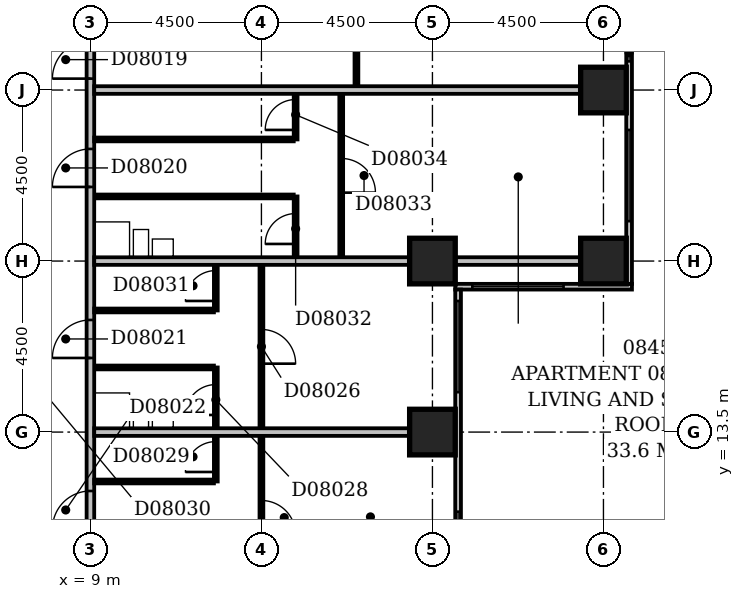
"""IFC4 building model, lengths in metres.
Left out: names, types, materials, properties, quantities, classifications, styles, units other than length and angle.
Written with IfcOpenShell. Run it as: python <this file> out.ifc"""

import sys

from ifc_helpers import new_model, si_unit, direction, frame, frame_2d, origin, origin_2d, place, context, subcontext, project, spatial, rectangle, extrude, element, fill, save


model = new_model("IFC4")
c1 = context("Model", 3, precision=1e-05, world=origin(), true_north=direction((0.0, 1.0)))
c2 = subcontext(c1, "Body", "Model", "MODEL_VIEW")
j1 = project(units=[si_unit("LENGTHUNIT", "METRE"), si_unit("PLANEANGLEUNIT", "RADIAN")], contexts=[c1])
p1 = place(None, origin())
s1 = spatial("IfcSite", under=j1, at=p1, CompositionType="ELEMENT")
p2 = place(p1, origin())
s2 = spatial("IfcBuilding", under=s1, at=p2, CompositionType="ELEMENT")
p3 = place(p2, frame((0.0, 0.0, 39.8)))
s3 = spatial("IfcBuildingStorey", under=s2, at=p3, CompositionType="ELEMENT", Elevation=39.8)
for number, where, z_axis, x_axis in (
    (1, (18.0, 13.5, -0.3), (0.0, 0.0, 1.0), (1.0, 0.0, 0.0)),
    (2, (18.0, 18.0, -0.3), (0.0, 0.0, 1.0), (1.0, 0.0, 0.0)),
    (3, (22.5, 18.0, -0.3), (0.0, 0.0, 1.0), (1.0, 0.0, 0.0)),
    (4, (22.5, 22.5, -0.3), (0.0, 0.0, 1.0), (1.0, 0.0, 0.0)),
):
    element("IfcColumn", number, at=place(p3, frame(where, z_axis=z_axis, x_axis=x_axis)), inside=s3, PredefinedType="COLUMN", context=c2, shape_type="SweptSolid", body=[
        extrude(rectangle(XDim=1.2, YDim=1.2, at=origin_2d()), origin(), (0.0, 0.0, 1.0), 3.6),
    ])
p4 = place(p3, frame((18.675, 8.4, 0.0), z_axis=(0.0, 0.0, 1.0), x_axis=(0.0, 1.0, 0.0)))
e5 = element("IfcWall", 5, at=p4, inside=s3, PredefinedType="STANDARD", context=c2, shape_type="SweptSolid", body=[
    extrude(rectangle(XDim=8.85, YDim=0.15, at=frame_2d((4.425, 0.0))), origin(), (0.0, 0.0, 1.0), 2.7),
])
p5 = place(p4, frame((1.505, 0.0, 0.6)))
e6 = element("IfcOpeningElement", 6, at=p5, cuts=e5, PredefinedType="OPENING", context=c2, shape_type="SweptSolid", body=[
    extrude(rectangle(XDim=1.5, YDim=1.8, at=frame_2d((0.75, 0.9))), frame((0.0, 0.087, 0.0), z_axis=(0.0, -1.0, 0.0), x_axis=(1.0, 0.0, 0.0)), (0.0, 0.0, 1.0), 0.174),
])
p6 = place(p4, frame((6.15, 0.0, 0.6)))
e7 = element("IfcOpeningElement", 7, at=p6, cuts=e5, PredefinedType="OPENING", context=c2, shape_type="SweptSolid", body=[
    extrude(rectangle(XDim=2.4, YDim=1.8, at=frame_2d((1.2, 0.9))), frame((0.0, 0.087, 0.0), z_axis=(0.0, -1.0, 0.0), x_axis=(1.0, 0.0, 0.0)), (0.0, 0.0, 1.0), 0.174),
])
p7 = place(p3, frame((18.6, 17.325, 0.0), z_axis=(0.0, 0.0, 1.0), x_axis=(1.0, 0.0, 0.0)))
e8 = element("IfcWall", 8, at=p7, inside=s3, PredefinedType="STANDARD", context=c2, shape_type="SweptSolid", body=[
    extrude(rectangle(XDim=4.65, YDim=0.15, at=frame_2d((2.325, 0.0))), origin(), (0.0, 0.0, 1.0), 2.7),
])
p8 = place(p7, frame((0.45, 0.0, 0.6)))
e9 = element("IfcOpeningElement", 9, at=p8, cuts=e8, PredefinedType="OPENING", context=c2, shape_type="SweptSolid", body=[
    extrude(rectangle(XDim=2.4, YDim=1.8, at=frame_2d((1.2, 0.9))), frame((0.0, 0.087, 0.0), z_axis=(0.0, -1.0, 0.0), x_axis=(1.0, 0.0, 0.0)), (0.0, 0.0, 1.0), 0.174),
])
p9 = place(p3, frame((23.175, 17.4, 0.0), z_axis=(0.0, 0.0, 1.0), x_axis=(0.0, 1.0, 0.0)))
e10 = element("IfcWall", 10, at=p9, inside=s3, PredefinedType="STANDARD", context=c2, shape_type="SweptSolid", body=[
    extrude(rectangle(XDim=17.85, YDim=0.15, at=frame_2d((8.925, 0.0))), origin(), (0.0, 0.0, 1.0), 2.7),
])
p10 = place(p9, frame((1.65, 0.0, 0.6)))
e11 = element("IfcOpeningElement", 11, at=p10, cuts=e10, PredefinedType="OPENING", context=c2, shape_type="SweptSolid", body=[
    extrude(rectangle(XDim=2.4, YDim=1.8, at=frame_2d((1.2, 0.9))), frame((0.0, 0.087, 0.0), z_axis=(0.0, -1.0, 0.0), x_axis=(1.0, 0.0, 0.0)), (0.0, 0.0, 1.0), 0.174),
])
p11 = place(p9, frame((5.854, 0.0, 0.6)))
e12 = element("IfcOpeningElement", 12, at=p11, cuts=e10, PredefinedType="OPENING", context=c2, shape_type="SweptSolid", body=[
    extrude(rectangle(XDim=0.45, YDim=1.8, at=frame_2d((0.225, 0.9))), frame((0.0, 0.087, 0.0), z_axis=(0.0, -1.0, 0.0), x_axis=(1.0, 0.0, 0.0)), (0.0, 0.0, 1.0), 0.174),
])
p12 = place(p9, frame((10.65, 0.0, 0.6)))
e13 = element("IfcOpeningElement", 13, at=p12, cuts=e10, PredefinedType="OPENING", context=c2, shape_type="SweptSolid", body=[
    extrude(rectangle(XDim=2.4, YDim=1.8, at=frame_2d((1.2, 0.9))), frame((0.0, 0.087, 0.0), z_axis=(0.0, -1.0, 0.0), x_axis=(1.0, 0.0, 0.0)), (0.0, 0.0, 1.0), 0.174),
])
p13 = place(p9, frame((15.15, 0.0, 0.6)))
e14 = element("IfcOpeningElement", 14, at=p13, cuts=e10, PredefinedType="OPENING", context=c2, shape_type="SweptSolid", body=[
    extrude(rectangle(XDim=2.4, YDim=1.8, at=frame_2d((1.2, 0.9))), frame((0.0, 0.087, 0.0), z_axis=(0.0, -1.0, 0.0), x_axis=(1.0, 0.0, 0.0)), (0.0, 0.0, 1.0), 0.174),
])
p14 = place(p3, frame((9.0, 5.0, 0.0), z_axis=(0.0, 0.0, 1.0), x_axis=(0.0, 1.0, 0.0)))
e15 = element("IfcWall", 15, at=p14, inside=s3, PredefinedType="PARTITIONING", context=c2, shape_type="SweptSolid", body=[
    extrude(rectangle(XDim=44.5, YDim=0.2, at=frame_2d((22.25, 0.0))), origin(), (0.0, 0.0, 1.0), 3.3),
])
p15 = place(p14, frame((17.8, 0.0, 0.0)))
e16 = element("IfcOpeningElement", 16, at=p15, cuts=e15, PredefinedType="OPENING", context=c2, shape_type="SweptSolid", body=[
    extrude(rectangle(XDim=1.0, YDim=2.1, at=frame_2d((0.5, 1.05))), frame((0.0, 0.112, 0.0), z_axis=(0.0, -1.0, 0.0), x_axis=(1.0, 0.0, 0.0)), (0.0, 0.0, 1.0), 0.224),
])
p16 = place(p14, frame((14.95, 0.0, 0.0)))
e17 = element("IfcOpeningElement", 17, at=p16, cuts=e15, PredefinedType="OPENING", context=c2, shape_type="SweptSolid", body=[
    extrude(rectangle(XDim=1.0, YDim=2.1, at=frame_2d((0.5, 1.05))), frame((0.0, 0.112, 0.0), z_axis=(0.0, -1.0, 0.0), x_axis=(1.0, 0.0, 0.0)), (0.0, 0.0, 1.0), 0.224),
])
p17 = place(p14, frame((10.45, 0.0, 0.0)))
e18 = element("IfcOpeningElement", 18, at=p17, cuts=e15, PredefinedType="OPENING", context=c2, shape_type="SweptSolid", body=[
    extrude(rectangle(XDim=1.0, YDim=2.1, at=frame_2d((0.5, 1.05))), frame((0.0, 0.112, 0.0), z_axis=(0.0, -1.0, 0.0), x_axis=(1.0, 0.0, 0.0)), (0.0, 0.0, 1.0), 0.224),
])
p18 = place(p14, frame((5.95, 0.0, 0.0)))
e19 = element("IfcOpeningElement", 19, at=p18, cuts=e15, PredefinedType="OPENING", context=c2, shape_type="SweptSolid", body=[
    extrude(rectangle(XDim=1.0, YDim=2.1, at=frame_2d((0.5, 1.05))), frame((0.0, 0.112, 0.0), z_axis=(0.0, -1.0, 0.0), x_axis=(1.0, 0.0, 0.0)), (0.0, 0.0, 1.0), 0.224),
])
p19 = place(p14, frame((32.75, 0.0, 0.0)))
e20 = element("IfcOpeningElement", 20, at=p19, cuts=e15, PredefinedType="OPENING", context=c2, shape_type="SweptSolid", body=[
    extrude(rectangle(XDim=0.9, YDim=2.1, at=frame_2d((0.45, 1.05))), frame((0.0, 0.112, 0.0), z_axis=(0.0, -1.0, 0.0), x_axis=(1.0, 0.0, 0.0)), (0.0, 0.0, 1.0), 0.224),
])
p20 = place(p14, frame((1.5, 0.0, 0.0)))
e21 = element("IfcOpeningElement", 21, at=p20, cuts=e15, PredefinedType="OPENING", context=c2, shape_type="SweptSolid", body=[
    extrude(rectangle(XDim=0.9, YDim=2.1, at=frame_2d((0.45, 1.05))), frame((0.0, 0.112, 0.0), z_axis=(0.0, -1.0, 0.0), x_axis=(1.0, 0.0, 0.0)), (0.0, 0.0, 1.0), 0.224),
])
p21 = place(p3, frame((13.5, 9.6, 0.0), z_axis=(0.0, 0.0, 1.0), x_axis=(0.0, 1.0, 0.0)))
e22 = element("IfcWall", 22, at=p21, inside=s3, PredefinedType="PARTITIONING", context=c2, shape_type="SweptSolid", body=[
    extrude(rectangle(XDim=8.3, YDim=0.1, at=frame_2d((4.15, 0.0))), origin(), (0.0, 0.0, 1.0), 3.3),
])
p22 = place(p21, frame((5.7, 0.0, 0.0)))
e23 = element("IfcOpeningElement", 23, at=p22, cuts=e22, PredefinedType="OPENING", context=c2, shape_type="SweptSolid", body=[
    extrude(rectangle(XDim=0.9, YDim=2.1, at=frame_2d((0.45, 1.05))), frame((0.0, 0.062, 0.0), z_axis=(0.0, -1.0, 0.0), x_axis=(1.0, 0.0, 0.0)), (0.0, 0.0, 1.0), 0.124),
])
p23 = place(p21, frame((1.2, 0.0, 0.0)))
e24 = element("IfcOpeningElement", 24, at=p23, cuts=e22, PredefinedType="OPENING", context=c2, shape_type="SweptSolid", body=[
    extrude(rectangle(XDim=0.9, YDim=2.1, at=frame_2d((0.45, 1.05))), frame((0.0, 0.062, 0.0), z_axis=(0.0, -1.0, 0.0), x_axis=(1.0, 0.0, 0.0)), (0.0, 0.0, 1.0), 0.124),
])
p24 = place(p3, frame((9.1, 12.2, 0.0), z_axis=(0.0, 0.0, 1.0), x_axis=(1.0, 0.0, 0.0)))
e25 = element("IfcWall", 25, at=p24, inside=s3, PredefinedType="PARTITIONING", context=c2, shape_type="SweptSolid", body=[
    extrude(rectangle(XDim=3.15, YDim=0.1, at=frame_2d((1.575, 0.0))), origin(), (0.0, 0.0, 1.0), 3.3),
])
p25 = place(p3, frame((12.3, 12.2, 0.0), z_axis=(0.0, 0.0, 1.0), x_axis=(0.0, 1.0, 0.0)))
e26 = element("IfcWall", 26, at=p25, inside=s3, PredefinedType="PARTITIONING", context=c2, shape_type="SweptSolid", body=[
    extrude(rectangle(XDim=3.0, YDim=0.1, at=frame_2d((1.5, 0.0))), origin(), (0.0, 0.0, 1.0), 3.3),
])
p26 = place(p25, frame((1.75, 0.0, 0.0)))
e27 = element("IfcOpeningElement", 27, at=p26, cuts=e26, PredefinedType="OPENING", context=c2, shape_type="SweptSolid", body=[
    extrude(rectangle(XDim=0.8, YDim=2.1, at=frame_2d((0.4, 1.05))), frame((0.0, 0.062, 0.0), z_axis=(0.0, -1.0, 0.0), x_axis=(1.0, 0.0, 0.0)), (0.0, 0.0, 1.0), 0.124),
])
p27 = place(p25, frame((0.25, 0.0, 0.0)))
e28 = element("IfcOpeningElement", 28, at=p27, cuts=e26, PredefinedType="OPENING", context=c2, shape_type="SweptSolid", body=[
    extrude(rectangle(XDim=0.8, YDim=2.1, at=frame_2d((0.4, 1.05))), frame((0.0, 0.062, 0.0), z_axis=(0.0, -1.0, 0.0), x_axis=(1.0, 0.0, 0.0)), (0.0, 0.0, 1.0), 0.124),
])
p28 = place(p3, frame((9.1, 13.5, 0.0), z_axis=(0.0, 0.0, 1.0), x_axis=(1.0, 0.0, 0.0)))
e29 = element("IfcWall", 29, at=p28, inside=s3, PredefinedType="PARTITIONING", context=c2, shape_type="SweptSolid", body=[
    extrude(rectangle(XDim=8.3, YDim=0.2, at=frame_2d((4.15, 0.0))), origin(), (0.0, 0.0, 1.0), 3.3),
])
p29 = place(p3, frame((9.1, 15.2, 0.0), z_axis=(0.0, 0.0, 1.0), x_axis=(1.0, 0.0, 0.0)))
e30 = element("IfcWall", 30, at=p29, inside=s3, PredefinedType="PLUMBINGWALL", context=c2, shape_type="SweptSolid", body=[
    extrude(rectangle(XDim=3.15, YDim=0.1, at=frame_2d((1.575, 0.0))), origin(), (0.0, 0.0, 1.0), 3.3),
])
p30 = place(p3, frame((9.1, 16.7, 0.0), z_axis=(0.0, 0.0, 1.0), x_axis=(1.0, 0.0, 0.0)))
e31 = element("IfcWall", 31, at=p30, inside=s3, PredefinedType="PARTITIONING", context=c2, shape_type="SweptSolid", body=[
    extrude(rectangle(XDim=3.15, YDim=0.1, at=frame_2d((1.575, 0.0))), origin(), (0.0, 0.0, 1.0), 3.3),
])
p31 = place(p3, frame((12.3, 16.7, 0.0), z_axis=(0.0, 0.0, 1.0), x_axis=(0.0, 1.0, 0.0)))
e32 = element("IfcWall", 32, at=p31, inside=s3, PredefinedType="PARTITIONING", context=c2, shape_type="SweptSolid", body=[
    extrude(rectangle(XDim=1.2, YDim=0.1, at=frame_2d((0.6, 0.0))), origin(), (0.0, 0.0, 1.0), 3.3),
])
p32 = place(p31, frame((0.25, 0.0, 0.0)))
e33 = element("IfcOpeningElement", 33, at=p32, cuts=e32, PredefinedType="OPENING", context=c2, shape_type="SweptSolid", body=[
    extrude(rectangle(XDim=0.8, YDim=2.1, at=frame_2d((0.4, 1.05))), frame((0.0, 0.062, 0.0), z_axis=(0.0, -1.0, 0.0), x_axis=(1.0, 0.0, 0.0)), (0.0, 0.0, 1.0), 0.124),
])
p33 = place(p3, frame((9.1, 18.0, 0.0), z_axis=(0.0, 0.0, 1.0), x_axis=(1.0, 0.0, 0.0)))
e34 = element("IfcWall", 34, at=p33, inside=s3, PredefinedType="PARTITIONING", context=c2, shape_type="SweptSolid", body=[
    extrude(rectangle(XDim=8.3, YDim=0.2, at=frame_2d((4.15, 0.0))), origin(), (0.0, 0.0, 1.0), 2.6),
])
p34 = place(p3, frame((18.6, 18.0, 0.0), z_axis=(0.0, 0.0, 1.0), x_axis=(1.0, 0.0, 0.0)))
e35 = element("IfcWall", 35, at=p34, inside=s3, PredefinedType="PARTITIONING", context=c2, shape_type="SweptSolid", body=[
    extrude(rectangle(XDim=3.3, YDim=0.2, at=frame_2d((1.65, 0.0))), origin(), (0.0, 0.0, 1.0), 2.7),
])
p35 = place(p3, frame((14.4, 18.1, 0.0), z_axis=(0.0, 0.0, 1.0), x_axis=(0.0, 1.0, 0.0)))
e36 = element("IfcWall", 36, at=p35, inside=s3, PredefinedType="PARTITIONING", context=c2, shape_type="SweptSolid", body=[
    extrude(rectangle(XDim=1.6, YDim=0.1, at=frame_2d((0.8, 0.0))), origin(), (0.0, 0.0, 1.0), 3.3),
])
p36 = place(p35, frame((0.35, 0.0, 0.0)))
e37 = element("IfcOpeningElement", 37, at=p36, cuts=e36, PredefinedType="OPENING", context=c2, shape_type="SweptSolid", body=[
    extrude(rectangle(XDim=0.8, YDim=2.1, at=frame_2d((0.4, 1.05))), frame((0.0, 0.062, 0.0), z_axis=(0.0, -1.0, 0.0), x_axis=(1.0, 0.0, 0.0)), (0.0, 0.0, 1.0), 0.124),
])
p37 = place(p3, frame((15.6, 18.1, 0.0), z_axis=(0.0, 0.0, 1.0), x_axis=(0.0, 1.0, 0.0)))
e38 = element("IfcWall", 38, at=p37, inside=s3, PredefinedType="PARTITIONING", context=c2, shape_type="SweptSolid", body=[
    extrude(rectangle(XDim=4.3, YDim=0.1, at=frame_2d((2.15, 0.0))), origin(), (0.0, 0.0, 1.0), 3.3),
])
p38 = place(p37, frame((1.7, 0.0, 0.0)))
e39 = element("IfcOpeningElement", 39, at=p38, cuts=e38, PredefinedType="OPENING", context=c2, shape_type="SweptSolid", body=[
    extrude(rectangle(XDim=0.9, YDim=2.1, at=frame_2d((0.45, 1.05))), frame((0.0, 0.062, 0.0), z_axis=(0.0, -1.0, 0.0), x_axis=(1.0, 0.0, 0.0)), (0.0, 0.0, 1.0), 0.124),
])
p39 = place(p3, frame((9.1, 19.7, 0.0), z_axis=(0.0, 0.0, 1.0), x_axis=(1.0, 0.0, 0.0)))
e40 = element("IfcWall", 40, at=p39, inside=s3, PredefinedType="PLUMBINGWALL", context=c2, shape_type="SweptSolid", body=[
    extrude(rectangle(XDim=5.25, YDim=0.1, at=frame_2d((2.625, 0.0))), origin(), (0.0, 0.0, 1.0), 3.3),
])
p40 = place(p3, frame((9.1, 21.2, 0.0), z_axis=(0.0, 0.0, 1.0), x_axis=(1.0, 0.0, 0.0)))
e41 = element("IfcWall", 41, at=p40, inside=s3, PredefinedType="PARTITIONING", context=c2, shape_type="SweptSolid", body=[
    extrude(rectangle(XDim=5.25, YDim=0.1, at=frame_2d((2.625, 0.0))), origin(), (0.0, 0.0, 1.0), 3.3),
])
p41 = place(p3, frame((14.4, 21.2, 0.0), z_axis=(0.0, 0.0, 1.0), x_axis=(0.0, 1.0, 0.0)))
e42 = element("IfcWall", 42, at=p41, inside=s3, PredefinedType="PARTITIONING", context=c2, shape_type="SweptSolid", body=[
    extrude(rectangle(XDim=1.2, YDim=0.1, at=frame_2d((0.6, 0.0))), origin(), (0.0, 0.0, 1.0), 3.3),
])
p42 = place(p41, frame((0.25, 0.0, 0.0)))
e43 = element("IfcOpeningElement", 43, at=p42, cuts=e42, PredefinedType="OPENING", context=c2, shape_type="SweptSolid", body=[
    extrude(rectangle(XDim=0.8, YDim=2.1, at=frame_2d((0.4, 1.05))), frame((0.0, 0.062, 0.0), z_axis=(0.0, -1.0, 0.0), x_axis=(1.0, 0.0, 0.0)), (0.0, 0.0, 1.0), 0.124),
])
p43 = place(p3, frame((9.1, 22.5, 0.0), z_axis=(0.0, 0.0, 1.0), x_axis=(1.0, 0.0, 0.0)))
e44 = element("IfcWall", 44, at=p43, inside=s3, PredefinedType="PARTITIONING", context=c2, shape_type="SweptSolid", body=[
    extrude(rectangle(XDim=12.8, YDim=0.2, at=frame_2d((6.4, 0.0))), origin(), (0.0, 0.0, 1.0), 3.3),
])
p44 = place(p3, frame((16.0, 22.6, 0.0), z_axis=(0.0, 0.0, 1.0), x_axis=(0.0, 1.0, 0.0)))
e45 = element("IfcWall", 45, at=p44, inside=s3, PredefinedType="PARTITIONING", context=c2, shape_type="SweptSolid", body=[
    extrude(rectangle(XDim=13.3, YDim=0.1, at=frame_2d((6.65, 0.0))), origin(), (0.0, 0.0, 1.0), 3.3),
])
p45 = place(p44, frame((3.9, 0.0, 0.0)))
e46 = element("IfcOpeningElement", 46, at=p45, cuts=e45, PredefinedType="OPENING", context=c2, shape_type="SweptSolid", body=[
    extrude(rectangle(XDim=0.9, YDim=2.1, at=frame_2d((0.45, 1.05))), frame((0.0, 0.062, 0.0), z_axis=(0.0, -1.0, 0.0), x_axis=(1.0, 0.0, 0.0)), (0.0, 0.0, 1.0), 0.124),
])
p46 = place(p44, frame((10.7, 0.0, 0.0)))
e47 = element("IfcOpeningElement", 47, at=p46, cuts=e45, PredefinedType="OPENING", context=c2, shape_type="SweptSolid", body=[
    extrude(rectangle(XDim=0.9, YDim=2.1, at=frame_2d((0.45, 1.05))), frame((0.0, 0.062, 0.0), z_axis=(0.0, -1.0, 0.0), x_axis=(1.0, 0.0, 0.0)), (0.0, 0.0, 1.0), 0.124),
])
p47 = place(p5, origin())
e48 = element("IfcWindow", 48, at=p47, inside=s3, PartitioningType="SINGLE_PANEL", PredefinedType="WINDOW", context=c2, shape_type="SweptSolid", body=[
    extrude(rectangle(XDim=1.5, YDim=1.8, at=frame_2d((0.75, 0.9))), frame((0.0, 0.03, 0.0), z_axis=(0.0, -1.0, 0.0), x_axis=(1.0, 0.0, 0.0)), (0.0, 0.0, 1.0), 0.06),
])
fill(e6, e48)
p48 = place(p6, origin())
e49 = element("IfcWindow", 49, at=p48, inside=s3, PartitioningType="SINGLE_PANEL", PredefinedType="WINDOW", context=c2, shape_type="SweptSolid", body=[
    extrude(rectangle(XDim=2.4, YDim=1.8, at=frame_2d((1.2, 0.9))), frame((0.0, 0.03, 0.0), z_axis=(0.0, -1.0, 0.0), x_axis=(1.0, 0.0, 0.0)), (0.0, 0.0, 1.0), 0.06),
])
fill(e7, e49)
p49 = place(p8, origin())
e50 = element("IfcWindow", 50, at=p49, inside=s3, PartitioningType="SINGLE_PANEL", PredefinedType="WINDOW", context=c2, shape_type="SweptSolid", body=[
    extrude(rectangle(XDim=2.4, YDim=1.8, at=frame_2d((1.2, 0.9))), frame((0.0, 0.03, 0.0), z_axis=(0.0, -1.0, 0.0), x_axis=(1.0, 0.0, 0.0)), (0.0, 0.0, 1.0), 0.06),
])
fill(e9, e50)
p50 = place(p10, origin())
e51 = element("IfcWindow", 51, at=p50, inside=s3, PartitioningType="SINGLE_PANEL", PredefinedType="WINDOW", context=c2, shape_type="SweptSolid", body=[
    extrude(rectangle(XDim=2.4, YDim=1.8, at=frame_2d((1.2, 0.9))), frame((0.0, 0.03, 0.0), z_axis=(0.0, -1.0, 0.0), x_axis=(1.0, 0.0, 0.0)), (0.0, 0.0, 1.0), 0.06),
])
fill(e11, e51)
p51 = place(p11, origin())
e52 = element("IfcWindow", 52, at=p51, inside=s3, PartitioningType="SINGLE_PANEL", PredefinedType="WINDOW", context=c2, shape_type="SweptSolid", body=[
    extrude(rectangle(XDim=0.45, YDim=1.8, at=frame_2d((0.225, 0.9))), frame((0.0, 0.03, 0.0), z_axis=(0.0, -1.0, 0.0), x_axis=(1.0, 0.0, 0.0)), (0.0, 0.0, 1.0), 0.06),
])
fill(e12, e52)
p52 = place(p15, origin())
e53 = element("IfcDoor", 53, at=p52, inside=s3, OperationType="SINGLE_SWING_LEFT", PredefinedType="DOOR", context=c2, shape_type="SweptSolid", body=[
    extrude(rectangle(XDim=1.0, YDim=2.1, at=frame_2d((0.5, 1.05))), frame((0.0, 0.025, 0.0), z_axis=(0.0, -1.0, 0.0), x_axis=(1.0, 0.0, 0.0)), (0.0, 0.0, 1.0), 0.05),
])
fill(e16, e53)
p53 = place(p16, origin())
e54 = element("IfcDoor", 54, at=p53, inside=s3, OperationType="SINGLE_SWING_LEFT", PredefinedType="DOOR", context=c2, shape_type="SweptSolid", body=[
    extrude(rectangle(XDim=1.0, YDim=2.1, at=frame_2d((0.5, 1.05))), frame((0.0, 0.025, 0.0), z_axis=(0.0, -1.0, 0.0), x_axis=(1.0, 0.0, 0.0)), (0.0, 0.0, 1.0), 0.05),
])
fill(e17, e54)
p54 = place(p17, origin())
e55 = element("IfcDoor", 55, at=p54, inside=s3, OperationType="SINGLE_SWING_LEFT", PredefinedType="DOOR", context=c2, shape_type="SweptSolid", body=[
    extrude(rectangle(XDim=1.0, YDim=2.1, at=frame_2d((0.5, 1.05))), frame((0.0, 0.025, 0.0), z_axis=(0.0, -1.0, 0.0), x_axis=(1.0, 0.0, 0.0)), (0.0, 0.0, 1.0), 0.05),
])
fill(e18, e55)
p55 = place(p18, origin())
e56 = element("IfcDoor", 56, at=p55, inside=s3, OperationType="SINGLE_SWING_LEFT", PredefinedType="DOOR", context=c2, shape_type="SweptSolid", body=[
    extrude(rectangle(XDim=1.0, YDim=2.1, at=frame_2d((0.5, 1.05))), frame((0.0, 0.025, 0.0), z_axis=(0.0, -1.0, 0.0), x_axis=(1.0, 0.0, 0.0)), (0.0, 0.0, 1.0), 0.05),
])
fill(e19, e56)
p56 = place(p22, frame((0.9, 0.0, 0.0), z_axis=(0.0, 0.0, 1.0), x_axis=(-1.0, 0.0, 0.0)))
e57 = element("IfcDoor", 57, at=p56, inside=s3, OperationType="SINGLE_SWING_RIGHT", PredefinedType="DOOR", context=c2, shape_type="SweptSolid", body=[
    extrude(rectangle(XDim=0.9, YDim=2.1, at=frame_2d((0.45, 1.05))), frame((0.0, 0.025, 0.0), z_axis=(0.0, -1.0, 0.0), x_axis=(1.0, 0.0, 0.0)), (0.0, 0.0, 1.0), 0.05),
])
fill(e23, e57)
p57 = place(p23, frame((0.9, 0.0, 0.0), z_axis=(0.0, 0.0, 1.0), x_axis=(-1.0, 0.0, 0.0)))
e58 = element("IfcDoor", 58, at=p57, inside=s3, OperationType="SINGLE_SWING_RIGHT", PredefinedType="DOOR", context=c2, shape_type="SweptSolid", body=[
    extrude(rectangle(XDim=0.9, YDim=2.1, at=frame_2d((0.45, 1.05))), frame((0.0, 0.025, 0.0), z_axis=(0.0, -1.0, 0.0), x_axis=(1.0, 0.0, 0.0)), (0.0, 0.0, 1.0), 0.05),
])
fill(e24, e58)
p58 = place(p26, origin())
e59 = element("IfcDoor", 59, at=p58, inside=s3, OperationType="SINGLE_SWING_LEFT", PredefinedType="DOOR", context=c2, shape_type="SweptSolid", body=[
    extrude(rectangle(XDim=0.8, YDim=2.1, at=frame_2d((0.4, 1.05))), frame((0.0, 0.025, 0.0), z_axis=(0.0, -1.0, 0.0), x_axis=(1.0, 0.0, 0.0)), (0.0, 0.0, 1.0), 0.05),
])
fill(e27, e59)
p59 = place(p27, origin())
e60 = element("IfcDoor", 60, at=p59, inside=s3, OperationType="SINGLE_SWING_LEFT", PredefinedType="DOOR", context=c2, shape_type="SweptSolid", body=[
    extrude(rectangle(XDim=0.8, YDim=2.1, at=frame_2d((0.4, 1.05))), frame((0.0, 0.025, 0.0), z_axis=(0.0, -1.0, 0.0), x_axis=(1.0, 0.0, 0.0)), (0.0, 0.0, 1.0), 0.05),
])
fill(e28, e60)
p60 = place(p32, origin())
e61 = element("IfcDoor", 61, at=p60, inside=s3, OperationType="SINGLE_SWING_LEFT", PredefinedType="DOOR", context=c2, shape_type="SweptSolid", body=[
    extrude(rectangle(XDim=0.8, YDim=2.1, at=frame_2d((0.4, 1.05))), frame((0.0, 0.025, 0.0), z_axis=(0.0, -1.0, 0.0), x_axis=(1.0, 0.0, 0.0)), (0.0, 0.0, 1.0), 0.05),
])
fill(e33, e61)
p61 = place(p36, origin())
e62 = element("IfcDoor", 62, at=p61, inside=s3, OperationType="SINGLE_SWING_LEFT", PredefinedType="DOOR", context=c2, shape_type="SweptSolid", body=[
    extrude(rectangle(XDim=0.8, YDim=2.1, at=frame_2d((0.4, 1.05))), frame((0.0, 0.025, 0.0), z_axis=(0.0, -1.0, 0.0), x_axis=(1.0, 0.0, 0.0)), (0.0, 0.0, 1.0), 0.05),
])
fill(e37, e62)
p62 = place(p38, frame((0.9, 0.0, 0.0), z_axis=(0.0, 0.0, 1.0), x_axis=(-1.0, 0.0, 0.0)))
e63 = element("IfcDoor", 63, at=p62, inside=s3, OperationType="SINGLE_SWING_RIGHT", PredefinedType="DOOR", context=c2, shape_type="SweptSolid", body=[
    extrude(rectangle(XDim=0.9, YDim=2.1, at=frame_2d((0.45, 1.05))), frame((0.0, 0.025, 0.0), z_axis=(0.0, -1.0, 0.0), x_axis=(1.0, 0.0, 0.0)), (0.0, 0.0, 1.0), 0.05),
])
fill(e39, e63)
p63 = place(p42, origin())
e64 = element("IfcDoor", 64, at=p63, inside=s3, OperationType="SINGLE_SWING_LEFT", PredefinedType="DOOR", context=c2, shape_type="SweptSolid", body=[
    extrude(rectangle(XDim=0.8, YDim=2.1, at=frame_2d((0.4, 1.05))), frame((0.0, 0.025, 0.0), z_axis=(0.0, -1.0, 0.0), x_axis=(1.0, 0.0, 0.0)), (0.0, 0.0, 1.0), 0.05),
])
fill(e43, e64)
save(model, sys.argv[1])
